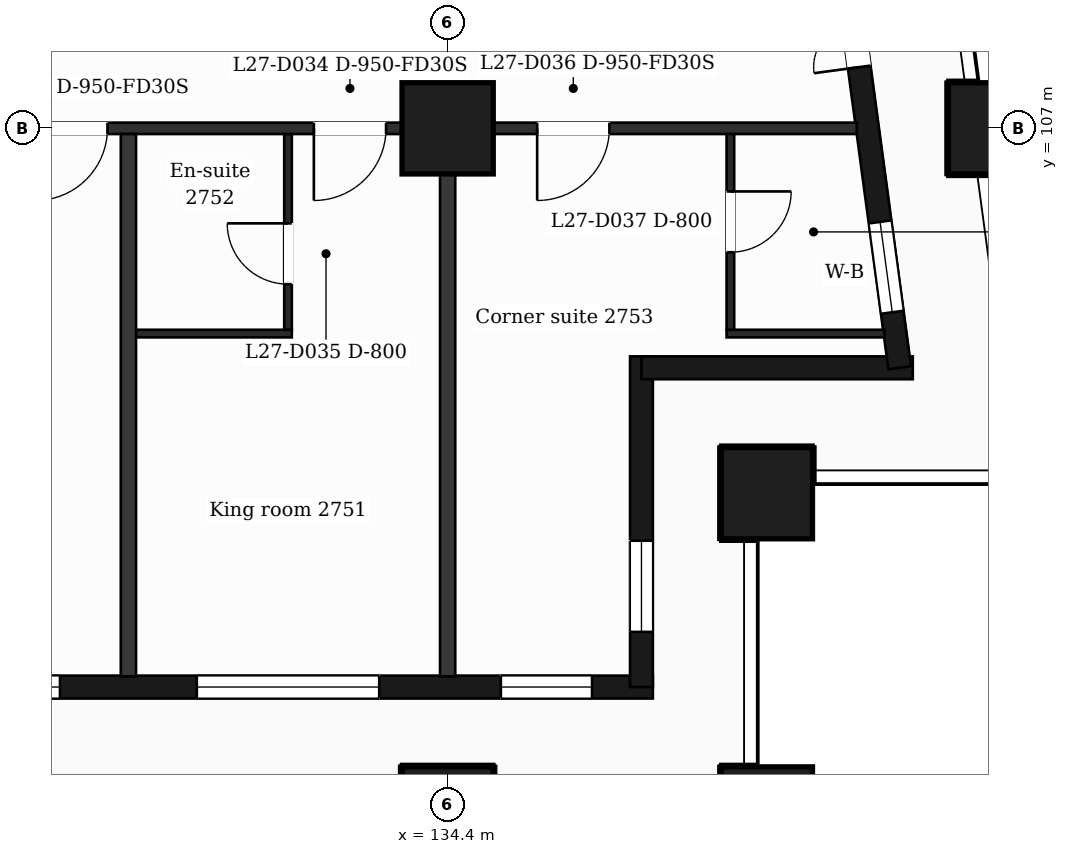
"""IFC4 building model, lengths in metres.
Left out: names, types, materials, properties, quantities, classifications, styles, units other than length and angle.
Written with IfcOpenShell. Run it as: python <this file> out.ifc"""

import sys

from ifc_helpers import new_model, si_unit, direction, frame, frame_2d, origin, origin_2d, place, context, subcontext, project, spatial, rectangle, extrude, element, fill, save


model = new_model("IFC4")
c1 = context("Model", 3, precision=1e-05, world=origin(), true_north=direction((0.0, 1.0)))
c2 = subcontext(c1, "Body", "Model", "MODEL_VIEW")
j1 = project(units=[si_unit("LENGTHUNIT", "METRE"), si_unit("PLANEANGLEUNIT", "RADIAN")], contexts=[c1])
p1 = place(None, origin())
s1 = spatial("IfcSite", under=j1, at=p1, CompositionType="ELEMENT")
p2 = place(p1, origin())
s2 = spatial("IfcBuilding", under=s1, at=p2, CompositionType="ELEMENT")
p3 = place(p2, frame((0.0, 0.0, 116.9)))
s3 = spatial("IfcBuildingStorey", under=s2, at=p3, CompositionType="ELEMENT", Elevation=116.9)
for number, where, z_axis, x_axis in (
    (1, (134.4, 98.0, 0.0), (0.0, 0.0, 1.0), (1.0, 0.0, 0.0)),
    (2, (138.6, 98.0, 0.0), (0.0, 0.0, 1.0), (1.0, 0.0, 0.0)),
    (3, (138.6, 102.2, 0.0), (0.0, 0.0, 1.0), (1.0, 0.0, 0.0)),
    (4, (134.4, 107.0, 0.0), (0.0, 0.0, 1.0), (1.0, 0.0, 0.0)),
    (5, (141.588, 107.0, 0.0), (0.0, 0.0, 1.0), (1.0, 0.0, 0.0)),
):
    element("IfcColumn", number, at=place(p3, frame(where, z_axis=z_axis, x_axis=x_axis)), inside=s3, PredefinedType="COLUMN", context=c2, shape_type="SweptSolid", body=[
        extrude(rectangle(XDim=1.2, YDim=1.2, at=origin_2d()), origin(), (0.0, 0.0, 1.0), 3.7),
    ])
p4 = place(p3, frame((89.85, 99.65, 0.0), z_axis=(0.0, 0.0, 1.0), x_axis=(1.0, 0.0, 0.0)))
e6 = element("IfcWall", 6, at=p4, inside=s3, PredefinedType="SOLIDWALL", context=c2, shape_type="SweptSolid", body=[
    extrude(rectangle(XDim=47.25, YDim=0.3, at=frame_2d((23.625, 0.0))), origin(), (0.0, 0.0, 1.0), 3.38),
])
p5 = place(p4, frame((0.725, 0.0, 0.9)))
e7 = element("IfcOpeningElement", 7, at=p5, cuts=e6, PredefinedType="OPENING", context=c2, shape_type="SweptSolid", body=[
    extrude(rectangle(XDim=1.2, YDim=2.1, at=frame_2d((0.6, 1.05))), frame((0.0, 0.16, 0.0), z_axis=(0.0, -1.0, 0.0), x_axis=(1.0, 0.0, 0.0)), (0.0, 0.0, 1.0), 0.32),
])
p6 = place(p4, frame((3.45, 0.0, 0.9)))
e8 = element("IfcOpeningElement", 8, at=p6, cuts=e6, PredefinedType="OPENING", context=c2, shape_type="SweptSolid", body=[
    extrude(rectangle(XDim=2.4, YDim=2.1, at=frame_2d((1.2, 1.05))), frame((0.0, 0.16, 0.0), z_axis=(0.0, -1.0, 0.0), x_axis=(1.0, 0.0, 0.0)), (0.0, 0.0, 1.0), 0.32),
])
p7 = place(p4, frame((7.35, 0.0, 0.0)))
e9 = element("IfcOpeningElement", 9, at=p7, cuts=e6, PredefinedType="OPENING", context=c2, shape_type="SweptSolid", body=[
    extrude(rectangle(XDim=1.2, YDim=2.4, at=frame_2d((0.6, 1.2))), frame((0.0, 0.16, 0.0), z_axis=(0.0, -1.0, 0.0), x_axis=(1.0, 0.0, 0.0)), (0.0, 0.0, 1.0), 0.32),
])
p8 = place(p4, frame((9.15, 0.0, 0.9)))
e10 = element("IfcOpeningElement", 10, at=p8, cuts=e6, PredefinedType="OPENING", context=c2, shape_type="SweptSolid", body=[
    extrude(rectangle(XDim=1.2, YDim=2.1, at=frame_2d((0.6, 1.05))), frame((0.0, 0.16, 0.0), z_axis=(0.0, -1.0, 0.0), x_axis=(1.0, 0.0, 0.0)), (0.0, 0.0, 1.0), 0.32),
])
p9 = place(p4, frame((11.85, 0.0, 0.9)))
e11 = element("IfcOpeningElement", 11, at=p9, cuts=e6, PredefinedType="OPENING", context=c2, shape_type="SweptSolid", body=[
    extrude(rectangle(XDim=2.4, YDim=2.1, at=frame_2d((1.2, 1.05))), frame((0.0, 0.16, 0.0), z_axis=(0.0, -1.0, 0.0), x_axis=(1.0, 0.0, 0.0)), (0.0, 0.0, 1.0), 0.32),
])
p10 = place(p4, frame((16.05, 0.0, 0.9)))
e12 = element("IfcOpeningElement", 12, at=p10, cuts=e6, PredefinedType="OPENING", context=c2, shape_type="SweptSolid", body=[
    extrude(rectangle(XDim=2.4, YDim=2.1, at=frame_2d((1.2, 1.05))), frame((0.0, 0.16, 0.0), z_axis=(0.0, -1.0, 0.0), x_axis=(1.0, 0.0, 0.0)), (0.0, 0.0, 1.0), 0.32),
])
p11 = place(p4, frame((20.85, 0.0, 0.9)))
e13 = element("IfcOpeningElement", 13, at=p11, cuts=e6, PredefinedType="OPENING", context=c2, shape_type="SweptSolid", body=[
    extrude(rectangle(XDim=1.2, YDim=2.1, at=frame_2d((0.6, 1.05))), frame((0.0, 0.16, 0.0), z_axis=(0.0, -1.0, 0.0), x_axis=(1.0, 0.0, 0.0)), (0.0, 0.0, 1.0), 0.32),
])
p12 = place(p4, frame((25.05, 0.0, 0.9)))
e14 = element("IfcOpeningElement", 14, at=p12, cuts=e6, PredefinedType="OPENING", context=c2, shape_type="SweptSolid", body=[
    extrude(rectangle(XDim=1.2, YDim=2.1, at=frame_2d((0.6, 1.05))), frame((0.0, 0.16, 0.0), z_axis=(0.0, -1.0, 0.0), x_axis=(1.0, 0.0, 0.0)), (0.0, 0.0, 1.0), 0.32),
])
p13 = place(p4, frame((28.65, 0.0, 0.9)))
e15 = element("IfcOpeningElement", 15, at=p13, cuts=e6, PredefinedType="OPENING", context=c2, shape_type="SweptSolid", body=[
    extrude(rectangle(XDim=2.4, YDim=2.1, at=frame_2d((1.2, 1.05))), frame((0.0, 0.16, 0.0), z_axis=(0.0, -1.0, 0.0), x_axis=(1.0, 0.0, 0.0)), (0.0, 0.0, 1.0), 0.32),
])
p14 = place(p4, frame((32.85, 0.0, 0.9)))
e16 = element("IfcOpeningElement", 16, at=p14, cuts=e6, PredefinedType="OPENING", context=c2, shape_type="SweptSolid", body=[
    extrude(rectangle(XDim=2.4, YDim=2.1, at=frame_2d((1.2, 1.05))), frame((0.0, 0.16, 0.0), z_axis=(0.0, -1.0, 0.0), x_axis=(1.0, 0.0, 0.0)), (0.0, 0.0, 1.0), 0.32),
])
p15 = place(p4, frame((37.05, 0.0, 0.9)))
e17 = element("IfcOpeningElement", 17, at=p15, cuts=e6, PredefinedType="OPENING", context=c2, shape_type="SweptSolid", body=[
    extrude(rectangle(XDim=2.4, YDim=2.1, at=frame_2d((1.2, 1.05))), frame((0.0, 0.16, 0.0), z_axis=(0.0, -1.0, 0.0), x_axis=(1.0, 0.0, 0.0)), (0.0, 0.0, 1.0), 0.32),
])
p16 = place(p4, frame((41.25, 0.0, 0.9)))
e18 = element("IfcOpeningElement", 18, at=p16, cuts=e6, PredefinedType="OPENING", context=c2, shape_type="SweptSolid", body=[
    extrude(rectangle(XDim=2.4, YDim=2.1, at=frame_2d((1.2, 1.05))), frame((0.0, 0.16, 0.0), z_axis=(0.0, -1.0, 0.0), x_axis=(1.0, 0.0, 0.0)), (0.0, 0.0, 1.0), 0.32),
])
p17 = place(p4, frame((45.25, 0.0, 0.9)))
e19 = element("IfcOpeningElement", 19, at=p17, cuts=e6, PredefinedType="OPENING", context=c2, shape_type="SweptSolid", body=[
    extrude(rectangle(XDim=1.2, YDim=2.1, at=frame_2d((0.6, 1.05))), frame((0.0, 0.16, 0.0), z_axis=(0.0, -1.0, 0.0), x_axis=(1.0, 0.0, 0.0)), (0.0, 0.0, 1.0), 0.32),
])
p18 = place(p3, frame((136.95, 99.65, 0.0), z_axis=(0.0, 0.0, 1.0), x_axis=(0.0, 1.0, 0.0)))
e20 = element("IfcWall", 20, at=p18, inside=s3, PredefinedType="SOLIDWALL", context=c2, shape_type="SweptSolid", body=[
    extrude(rectangle(XDim=4.35, YDim=0.3, at=frame_2d((2.175, 0.0))), origin(), (0.0, 0.0, 1.0), 3.38),
])
p19 = place(p18, frame((0.725, 0.0, 0.9)))
e21 = element("IfcOpeningElement", 21, at=p19, cuts=e20, PredefinedType="OPENING", context=c2, shape_type="SweptSolid", body=[
    extrude(rectangle(XDim=1.2, YDim=2.1, at=frame_2d((0.6, 1.05))), frame((0.0, 0.16, 0.0), z_axis=(0.0, -1.0, 0.0), x_axis=(1.0, 0.0, 0.0)), (0.0, 0.0, 1.0), 0.32),
])
p20 = place(p3, frame((136.95, 103.85, 0.0), z_axis=(0.0, 0.0, 1.0), x_axis=(1.0, 0.0, 0.0)))
e22 = element("IfcWall", 22, at=p20, inside=s3, PredefinedType="SOLIDWALL", context=c2, shape_type="SweptSolid", body=[
    extrude(rectangle(XDim=3.569, YDim=0.3, at=frame_2d((1.785, 0.0))), origin(), (0.0, 0.0, 1.0), 3.38),
])
p21 = place(p3, frame((140.348, 103.85, 0.0), z_axis=(0.0, 0.0, 1.0), x_axis=(-0.133431549479, 0.991058031401, 0.0)))
e23 = element("IfcWall", 23, at=p21, inside=s3, PredefinedType="SOLIDWALL", context=c2, shape_type="SweptSolid", body=[
    extrude(rectangle(XDim=6.609, YDim=0.3, at=frame_2d((3.304, 0.0))), origin(), (0.0, 0.0, 1.0), 3.38),
])
p22 = place(p21, frame((0.737, 0.0, 0.9)))
e24 = element("IfcOpeningElement", 24, at=p22, cuts=e23, PredefinedType="OPENING", context=c2, shape_type="SweptSolid", body=[
    extrude(rectangle(XDim=1.2, YDim=2.1, at=frame_2d((0.6, 1.05))), frame((0.0, 0.16, 0.0), z_axis=(0.0, -1.0, 0.0), x_axis=(1.0, 0.0, 0.0)), (0.0, 0.0, 1.0), 0.32),
])
p23 = place(p21, frame((3.991, 0.0, 0.0)))
e25 = element("IfcOpeningElement", 25, at=p23, cuts=e23, PredefinedType="OPENING", context=c2, shape_type="SweptSolid", body=[
    extrude(rectangle(XDim=1.2, YDim=2.4, at=frame_2d((0.6, 1.2))), frame((0.0, 0.16, 0.0), z_axis=(0.0, -1.0, 0.0), x_axis=(1.0, 0.0, 0.0)), (0.0, 0.0, 1.0), 0.32),
])
p24 = place(p3, frame((130.2, 104.3, 0.0), z_axis=(0.0, 0.0, 1.0), x_axis=(1.0, 0.0, 0.0)))
e26 = element("IfcWall", 26, at=p24, inside=s3, PredefinedType="PARTITIONING", context=c2, shape_type="SweptSolid", body=[
    extrude(rectangle(XDim=2.15, YDim=0.1, at=frame_2d((1.075, 0.0))), origin(), (0.0, 0.0, 1.0), 3.38),
])
p25 = place(p3, frame((138.07, 104.3, 0.0), z_axis=(0.0, 0.0, 1.0), x_axis=(1.0, 0.0, 0.0)))
e27 = element("IfcWall", 27, at=p25, inside=s3, PredefinedType="PARTITIONING", context=c2, shape_type="SweptSolid", body=[
    extrude(rectangle(XDim=2.076, YDim=0.1, at=frame_2d((1.038, 0.0))), origin(), (0.0, 0.0, 1.0), 3.38),
])
p26 = place(p3, frame((87.018, 107.0, 0.0), z_axis=(0.0, 0.0, 1.0), x_axis=(1.0, 0.0, 0.0)))
e28 = element("IfcWall", 28, at=p26, inside=s3, PredefinedType="PARTITIONING", context=c2, shape_type="SweptSolid", body=[
    extrude(rectangle(XDim=52.765, YDim=0.15, at=frame_2d((26.382, 0.0))), origin(), (0.0, 0.0, 1.0), 3.38),
])
p27 = place(p26, frame((1.276, 0.0, 0.0)))
e29 = element("IfcOpeningElement", 29, at=p27, cuts=e28, PredefinedType="OPENING", context=c2, shape_type="SweptSolid", body=[
    extrude(rectangle(XDim=0.95, YDim=2.1, at=frame_2d((0.475, 1.05))), frame((0.0, 0.085, 0.0), z_axis=(0.0, -1.0, 0.0), x_axis=(1.0, 0.0, 0.0)), (0.0, 0.0, 1.0), 0.17),
])
p28 = place(p26, frame((6.192, 0.0, 0.0)))
e30 = element("IfcOpeningElement", 30, at=p28, cuts=e28, PredefinedType="OPENING", context=c2, shape_type="SweptSolid", body=[
    extrude(rectangle(XDim=0.95, YDim=2.1, at=frame_2d((0.475, 1.05))), frame((0.0, 0.085, 0.0), z_axis=(0.0, -1.0, 0.0), x_axis=(1.0, 0.0, 0.0)), (0.0, 0.0, 1.0), 0.17),
])
p29 = place(p26, frame((11.982, 0.0, 0.0)))
e31 = element("IfcOpeningElement", 31, at=p29, cuts=e28, PredefinedType="OPENING", context=c2, shape_type="SweptSolid", body=[
    extrude(rectangle(XDim=1.0, YDim=2.1, at=frame_2d((0.5, 1.05))), frame((0.0, 0.085, 0.0), z_axis=(0.0, -1.0, 0.0), x_axis=(1.0, 0.0, 0.0)), (0.0, 0.0, 1.0), 0.17),
])
p30 = place(p26, frame((14.582, 0.0, 0.0)))
e32 = element("IfcOpeningElement", 32, at=p30, cuts=e28, PredefinedType="OPENING", context=c2, shape_type="SweptSolid", body=[
    extrude(rectangle(XDim=0.95, YDim=2.1, at=frame_2d((0.475, 1.05))), frame((0.0, 0.085, 0.0), z_axis=(0.0, -1.0, 0.0), x_axis=(1.0, 0.0, 0.0)), (0.0, 0.0, 1.0), 0.17),
])
p31 = place(p26, frame((18.257, 0.0, 0.0)))
e33 = element("IfcOpeningElement", 33, at=p31, cuts=e28, PredefinedType="OPENING", context=c2, shape_type="SweptSolid", body=[
    extrude(rectangle(XDim=0.95, YDim=2.1, at=frame_2d((0.475, 1.05))), frame((0.0, 0.085, 0.0), z_axis=(0.0, -1.0, 0.0), x_axis=(1.0, 0.0, 0.0)), (0.0, 0.0, 1.0), 0.17),
])
p32 = place(p26, frame((22.992, 0.0, 0.0)))
e34 = element("IfcOpeningElement", 34, at=p32, cuts=e28, PredefinedType="OPENING", context=c2, shape_type="SweptSolid", body=[
    extrude(rectangle(XDim=0.95, YDim=2.1, at=frame_2d((0.475, 1.05))), frame((0.0, 0.085, 0.0), z_axis=(0.0, -1.0, 0.0), x_axis=(1.0, 0.0, 0.0)), (0.0, 0.0, 1.0), 0.17),
])
p33 = place(p26, frame((26.632, 0.0, 0.0)))
e35 = element("IfcOpeningElement", 35, at=p33, cuts=e28, PredefinedType="OPENING", context=c2, shape_type="SweptSolid", body=[
    extrude(rectangle(XDim=1.0, YDim=2.1, at=frame_2d((0.5, 1.05))), frame((0.0, 0.085, 0.0), z_axis=(0.0, -1.0, 0.0), x_axis=(1.0, 0.0, 0.0)), (0.0, 0.0, 1.0), 0.17),
])
p34 = place(p26, frame((33.557, 0.0, 0.0)))
e36 = element("IfcOpeningElement", 36, at=p34, cuts=e28, PredefinedType="OPENING", context=c2, shape_type="SweptSolid", body=[
    extrude(rectangle(XDim=0.95, YDim=2.1, at=frame_2d((0.475, 1.05))), frame((0.0, 0.085, 0.0), z_axis=(0.0, -1.0, 0.0), x_axis=(1.0, 0.0, 0.0)), (0.0, 0.0, 1.0), 0.17),
])
p35 = place(p26, frame((37.182, 0.0, 0.0)))
e37 = element("IfcOpeningElement", 37, at=p35, cuts=e28, PredefinedType="OPENING", context=c2, shape_type="SweptSolid", body=[
    extrude(rectangle(XDim=0.95, YDim=2.1, at=frame_2d((0.475, 1.05))), frame((0.0, 0.085, 0.0), z_axis=(0.0, -1.0, 0.0), x_axis=(1.0, 0.0, 0.0)), (0.0, 0.0, 1.0), 0.17),
])
p36 = place(p26, frame((41.957, 0.0, 0.0)))
e38 = element("IfcOpeningElement", 38, at=p36, cuts=e28, PredefinedType="OPENING", context=c2, shape_type="SweptSolid", body=[
    extrude(rectangle(XDim=0.95, YDim=2.1, at=frame_2d((0.475, 1.05))), frame((0.0, 0.085, 0.0), z_axis=(0.0, -1.0, 0.0), x_axis=(1.0, 0.0, 0.0)), (0.0, 0.0, 1.0), 0.17),
])
p37 = place(p26, frame((45.622, 0.0, 0.0)))
e39 = element("IfcOpeningElement", 39, at=p37, cuts=e28, PredefinedType="OPENING", context=c2, shape_type="SweptSolid", body=[
    extrude(rectangle(XDim=0.95, YDim=2.1, at=frame_2d((0.475, 1.05))), frame((0.0, 0.085, 0.0), z_axis=(0.0, -1.0, 0.0), x_axis=(1.0, 0.0, 0.0)), (0.0, 0.0, 1.0), 0.17),
])
p38 = place(p26, frame((48.56, 0.0, 0.0)))
e40 = element("IfcOpeningElement", 40, at=p38, cuts=e28, PredefinedType="OPENING", context=c2, shape_type="SweptSolid", body=[
    extrude(rectangle(XDim=0.95, YDim=2.1, at=frame_2d((0.475, 1.05))), frame((0.0, 0.085, 0.0), z_axis=(0.0, -1.0, 0.0), x_axis=(1.0, 0.0, 0.0)), (0.0, 0.0, 1.0), 0.17),
])
p39 = place(p3, frame((130.2, 99.79, 0.0), z_axis=(0.0, 0.0, 1.0), x_axis=(0.0, 1.0, 0.0)))
e41 = element("IfcWall", 41, at=p39, inside=s3, PredefinedType="PARTITIONING", context=c2, shape_type="SweptSolid", body=[
    extrude(rectangle(XDim=7.135, YDim=0.2, at=frame_2d((3.567, 0.0))), origin(), (0.0, 0.0, 1.0), 3.38),
])
p40 = place(p3, frame((132.3, 104.35, 0.0), z_axis=(0.0, 0.0, 1.0), x_axis=(0.0, 1.0, 0.0)))
e42 = element("IfcWall", 42, at=p40, inside=s3, PredefinedType="PARTITIONING", context=c2, shape_type="SweptSolid", body=[
    extrude(rectangle(XDim=2.575, YDim=0.1, at=frame_2d((1.288, 0.0))), origin(), (0.0, 0.0, 1.0), 3.38),
])
p41 = place(p40, frame((0.6, 0.0, 0.0)))
e43 = element("IfcOpeningElement", 43, at=p41, cuts=e42, PredefinedType="OPENING", context=c2, shape_type="SweptSolid", body=[
    extrude(rectangle(XDim=0.8, YDim=2.1, at=frame_2d((0.4, 1.05))), frame((0.0, 0.06, 0.0), z_axis=(0.0, -1.0, 0.0), x_axis=(1.0, 0.0, 0.0)), (0.0, 0.0, 1.0), 0.12),
])
p42 = place(p3, frame((134.4, 99.79, 0.0), z_axis=(0.0, 0.0, 1.0), x_axis=(0.0, 1.0, 0.0)))
e44 = element("IfcWall", 44, at=p42, inside=s3, PredefinedType="PARTITIONING", context=c2, shape_type="SweptSolid", body=[
    extrude(rectangle(XDim=7.135, YDim=0.2, at=frame_2d((3.567, 0.0))), origin(), (0.0, 0.0, 1.0), 3.38),
])
p43 = place(p3, frame((138.12, 104.35, 0.0), z_axis=(0.0, 0.0, 1.0), x_axis=(0.0, 1.0, 0.0)))
e45 = element("IfcWall", 45, at=p43, inside=s3, PredefinedType="PARTITIONING", context=c2, shape_type="SweptSolid", body=[
    extrude(rectangle(XDim=2.575, YDim=0.1, at=frame_2d((1.288, 0.0))), origin(), (0.0, 0.0, 1.0), 3.38),
])
p44 = place(p43, frame((1.02, 0.0, 0.0)))
e46 = element("IfcOpeningElement", 46, at=p44, cuts=e45, PredefinedType="OPENING", context=c2, shape_type="SweptSolid", body=[
    extrude(rectangle(XDim=0.8, YDim=2.1, at=frame_2d((0.4, 1.05))), frame((0.0, 0.06, 0.0), z_axis=(0.0, -1.0, 0.0), x_axis=(1.0, 0.0, 0.0)), (0.0, 0.0, 1.0), 0.12),
])
p45 = place(p15, origin())
e47 = element("IfcWindow", 47, at=p45, inside=s3, PartitioningType="SINGLE_PANEL", PredefinedType="WINDOW", context=c2, shape_type="SweptSolid", body=[
    extrude(rectangle(XDim=2.4, YDim=2.1, at=frame_2d((1.2, 1.05))), frame((0.0, 0.03, 0.0), z_axis=(0.0, -1.0, 0.0), x_axis=(1.0, 0.0, 0.0)), (0.0, 0.0, 1.0), 0.06),
])
fill(e17, e47)
p46 = place(p16, origin())
e48 = element("IfcWindow", 48, at=p46, inside=s3, PartitioningType="SINGLE_PANEL", PredefinedType="WINDOW", context=c2, shape_type="SweptSolid", body=[
    extrude(rectangle(XDim=2.4, YDim=2.1, at=frame_2d((1.2, 1.05))), frame((0.0, 0.03, 0.0), z_axis=(0.0, -1.0, 0.0), x_axis=(1.0, 0.0, 0.0)), (0.0, 0.0, 1.0), 0.06),
])
fill(e18, e48)
p47 = place(p17, origin())
e49 = element("IfcWindow", 49, at=p47, inside=s3, PartitioningType="SINGLE_PANEL", PredefinedType="WINDOW", context=c2, shape_type="SweptSolid", body=[
    extrude(rectangle(XDim=1.2, YDim=2.1, at=frame_2d((0.6, 1.05))), frame((0.0, 0.03, 0.0), z_axis=(0.0, -1.0, 0.0), x_axis=(1.0, 0.0, 0.0)), (0.0, 0.0, 1.0), 0.06),
])
fill(e19, e49)
p48 = place(p19, origin())
e50 = element("IfcWindow", 50, at=p48, inside=s3, PartitioningType="SINGLE_PANEL", PredefinedType="WINDOW", context=c2, shape_type="SweptSolid", body=[
    extrude(rectangle(XDim=1.2, YDim=2.1, at=frame_2d((0.6, 1.05))), frame((0.0, 0.03, 0.0), z_axis=(0.0, -1.0, 0.0), x_axis=(1.0, 0.0, 0.0)), (0.0, 0.0, 1.0), 0.06),
])
fill(e21, e50)
p49 = place(p22, origin())
e51 = element("IfcWindow", 51, at=p49, inside=s3, PartitioningType="SINGLE_PANEL", PredefinedType="WINDOW", context=c2, shape_type="SweptSolid", body=[
    extrude(rectangle(XDim=1.2, YDim=2.1, at=frame_2d((0.6, 1.05))), frame((0.0, 0.03, 0.0), z_axis=(0.0, -1.0, 0.0), x_axis=(1.0, 0.0, 0.0)), (0.0, 0.0, 1.0), 0.06),
])
fill(e24, e51)
p50 = place(p23, origin())
e52 = element("IfcDoor", 52, at=p50, inside=s3, OperationType="DOUBLE_DOOR_SINGLE_SWING", PredefinedType="DOOR", context=c2, shape_type="SweptSolid", body=[
    extrude(rectangle(XDim=1.2, YDim=2.4, at=frame_2d((0.6, 1.2))), frame((0.0, 0.025, 0.0), z_axis=(0.0, -1.0, 0.0), x_axis=(1.0, 0.0, 0.0)), (0.0, 0.0, 1.0), 0.05),
])
fill(e25, e52)
p51 = place(p36, origin())
e53 = element("IfcDoor", 53, at=p51, inside=s3, OperationType="SINGLE_SWING_LEFT", PredefinedType="DOOR", context=c2, shape_type="SweptSolid", body=[
    extrude(rectangle(XDim=0.95, YDim=2.1, at=frame_2d((0.475, 1.05))), frame((0.0, 0.025, 0.0), z_axis=(0.0, -1.0, 0.0), x_axis=(1.0, 0.0, 0.0)), (0.0, 0.0, 1.0), 0.05),
])
fill(e38, e53)
p52 = place(p37, origin())
e54 = element("IfcDoor", 54, at=p52, inside=s3, OperationType="SINGLE_SWING_LEFT", PredefinedType="DOOR", context=c2, shape_type="SweptSolid", body=[
    extrude(rectangle(XDim=0.95, YDim=2.1, at=frame_2d((0.475, 1.05))), frame((0.0, 0.025, 0.0), z_axis=(0.0, -1.0, 0.0), x_axis=(1.0, 0.0, 0.0)), (0.0, 0.0, 1.0), 0.05),
])
fill(e39, e54)
p53 = place(p41, origin())
e55 = element("IfcDoor", 55, at=p53, inside=s3, OperationType="SINGLE_SWING_RIGHT", PredefinedType="DOOR", context=c2, shape_type="SweptSolid", body=[
    extrude(rectangle(XDim=0.8, YDim=2.1, at=frame_2d((0.4, 1.05))), frame((0.0, 0.025, 0.0), z_axis=(0.0, -1.0, 0.0), x_axis=(1.0, 0.0, 0.0)), (0.0, 0.0, 1.0), 0.05),
])
fill(e43, e55)
p54 = place(p38, origin())
e56 = element("IfcDoor", 56, at=p54, inside=s3, OperationType="SINGLE_SWING_LEFT", PredefinedType="DOOR", context=c2, shape_type="SweptSolid", body=[
    extrude(rectangle(XDim=0.95, YDim=2.1, at=frame_2d((0.475, 1.05))), frame((0.0, 0.025, 0.0), z_axis=(0.0, -1.0, 0.0), x_axis=(1.0, 0.0, 0.0)), (0.0, 0.0, 1.0), 0.05),
])
fill(e40, e56)
p55 = place(p44, origin())
e57 = element("IfcDoor", 57, at=p55, inside=s3, OperationType="SINGLE_SWING_RIGHT", PredefinedType="DOOR", context=c2, shape_type="SweptSolid", body=[
    extrude(rectangle(XDim=0.8, YDim=2.1, at=frame_2d((0.4, 1.05))), frame((0.0, 0.025, 0.0), z_axis=(0.0, -1.0, 0.0), x_axis=(1.0, 0.0, 0.0)), (0.0, 0.0, 1.0), 0.05),
])
fill(e46, e57)
save(model, sys.argv[1])
